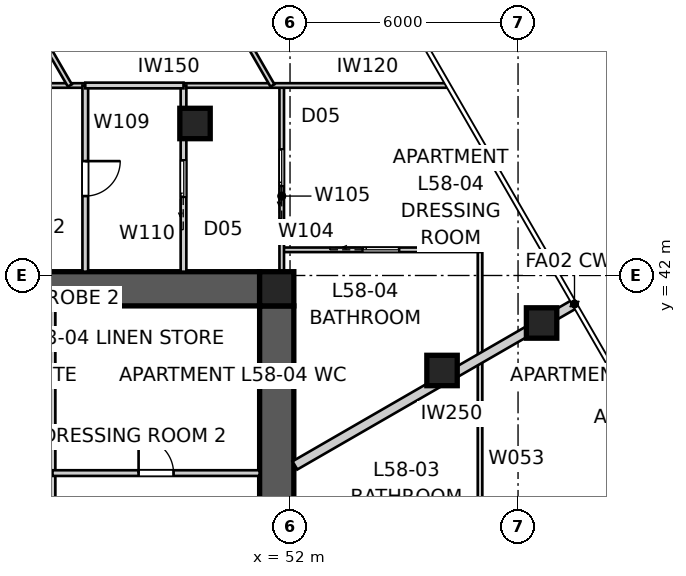
"""IFC4 building model, lengths in metres.
Left out: names, types, materials, properties, quantities, classifications, styles, units other than length and angle.
Written with IfcOpenShell. Run it as: python <this file> out.ifc"""

import sys

from ifc_helpers import new_model, si_unit, direction, frame, frame_2d, origin, origin_2d, place, context, subcontext, project, spatial, polyline, rectangle, outline, extrude, element, fill, save


model = new_model("IFC4")
c1 = context("Model", 3, precision=1e-05, world=origin(), true_north=direction((0.0, 1.0)))
c2 = subcontext(c1, "Body", "Model", "MODEL_VIEW")
j1 = project(units=[si_unit("LENGTHUNIT", "METRE"), si_unit("PLANEANGLEUNIT", "RADIAN")], contexts=[c1])
p1 = place(None, origin())
s1 = spatial("IfcSite", under=j1, at=p1, CompositionType="ELEMENT")
p2 = place(p1, origin())
s2 = spatial("IfcBuilding", under=s1, at=p2, CompositionType="ELEMENT")
p3 = place(p2, frame((0.0, 0.0, 211.6)))
s3 = spatial("IfcBuildingStorey", under=s2, at=p3, CompositionType="ELEMENT", Elevation=211.6)
p4 = place(p3, frame((28.8, 41.65, 0.0), z_axis=(0.0, 0.0, 1.0), x_axis=(1.0, 0.0, 0.0)))
e1 = element("IfcWall", 1, at=p4, inside=s3, PredefinedType="SHEAR", context=c2, shape_type="SweptSolid", body=[
    extrude(outline(polyline([(0.0, -0.45), (22.4, -0.45), (22.4, -0.025), (22.85, -0.025), (22.85, 0.025), (22.4, 0.025), (22.4, 0.45), (0.0, 0.45), (0.0, 0.025), (-0.45, 0.025), (-0.45, -0.025), (0.0, -0.025), (0.0, -0.45)])), origin(), (0.0, 0.0, 1.0), 3.4),
])
p5 = place(p3, frame((51.65, 18.8, 0.0), z_axis=(0.0, 0.0, 1.0), x_axis=(0.0, 1.0, 0.0)))
e2 = element("IfcWall", 2, at=p5, inside=s3, PredefinedType="SHEAR", context=c2, shape_type="SweptSolid", body=[
    extrude(outline(polyline([(0.0, -0.45), (22.4, -0.45), (22.4, -0.025), (22.85, -0.025), (22.85, 0.025), (22.4, 0.025), (22.4, 0.45), (0.0, 0.45), (0.0, 0.025), (-0.45, 0.025), (-0.45, -0.025), (0.0, -0.025), (0.0, -0.45)])), origin(), (0.0, 0.0, 1.0), 3.4),
])
p6 = place(p5, frame((11.14, 0.0, 0.0)))
e3 = element("IfcOpeningElement", 3, at=p6, cuts=e2, PredefinedType="OPENING", context=c2, shape_type="SweptSolid", body=[
    extrude(rectangle(XDim=1.02, YDim=2.4, at=frame_2d((0.51, 1.2))), frame((0.0, 0.46, 0.0), z_axis=(0.0, -1.0, 0.0), x_axis=(1.0, 0.0, 0.0)), (0.0, 0.0, 1.0), 0.92),
])
p7 = place(p3, frame((51.65, 41.65, 0.0), z_axis=(0.0, 0.0, 1.0), x_axis=(1.0, 0.0, 0.0)))
e4 = element("IfcColumn", 4, at=p7, inside=s3, PredefinedType="COLUMN", context=c2, shape_type="SweptSolid", body=[
    extrude(rectangle(XDim=0.9, YDim=0.9, at=origin_2d()), origin(), (0.0, 0.0, 1.0), 3.4),
])
for number, where, z_axis, x_axis in (
    (5, (58.62, 40.75, 0.0), (0.0, 0.0, 1.0), (1.0, 0.0, 0.0)),
    (6, (56.0, 39.5, 0.0), (0.0, 0.0, 1.0), (1.0, 0.0, 0.0)),
    (7, (49.5, 46.0, 0.0), (0.0, 0.0, 1.0), (1.0, 0.0, 0.0)),
):
    element("IfcColumn", number, at=place(p3, frame(where, z_axis=z_axis, x_axis=x_axis)), inside=s3, PredefinedType="COLUMN", context=c2, shape_type="SweptSolid", body=[
        extrude(rectangle(XDim=0.8, YDim=0.8, at=origin_2d()), origin(), (0.0, 0.0, 1.0), 3.4),
    ])
p8 = place(p3, frame((59.486, 41.25, 0.0), z_axis=(0.0, 0.0, 1.0), x_axis=(-0.866020489494, -0.500008511703, 0.0)))
e8 = element("IfcWall", 8, at=p8, inside=s3, PredefinedType="PARTITIONING", context=c2, shape_type="SweptSolid", body=[
    extrude(rectangle(XDim=8.496, YDim=0.25, at=frame_2d((4.248, 0.0))), origin(), (0.0, 0.0, 1.0), 3.25),
])
p9 = place(p3, frame((45.75, 41.2, 0.0), z_axis=(0.0, 0.0, 1.0), x_axis=(0.0, -1.0, 0.0)))
e9 = element("IfcWall", 9, at=p9, inside=s3, PredefinedType="SOLIDWALL", context=c2, shape_type="SweptSolid", body=[
    extrude(rectangle(XDim=5.9, YDim=0.15, at=frame_2d((2.95, 0.0))), origin(), (0.0, 0.0, 1.0), 3.25),
])
p10 = place(p3, frame((45.75, 36.8, 0.0), z_axis=(0.0, 0.0, 1.0), x_axis=(1.0, 0.0, 0.0)))
e10 = element("IfcWall", 10, at=p10, inside=s3, PredefinedType="SOLIDWALL", context=c2, shape_type="SweptSolid", body=[
    extrude(rectangle(XDim=5.45, YDim=0.15, at=frame_2d((2.725, 0.0))), origin(), (0.0, 0.0, 1.0), 3.25),
])
p11 = place(p10, frame((2.265, 0.0, 0.0)))
e11 = element("IfcOpeningElement", 11, at=p11, cuts=e10, PredefinedType="OPENING", context=c2, shape_type="SweptSolid", body=[
    extrude(rectangle(XDim=0.92, YDim=2.1, at=frame_2d((0.46, 1.05))), frame((0.0, 0.085, 0.0), z_axis=(0.0, -1.0, 0.0), x_axis=(1.0, 0.0, 0.0)), (0.0, 0.0, 1.0), 0.17),
])
p12 = place(p3, frame((57.0, 42.676, 0.0), z_axis=(0.0, 0.0, 1.0), x_axis=(0.0, -1.0, 0.0)))
e12 = element("IfcWall", 12, at=p12, inside=s3, PredefinedType="PARTITIONING", context=c2, shape_type="SweptSolid", body=[
    extrude(rectangle(XDim=23.19, YDim=0.12, at=frame_2d((11.595, 0.0))), origin(), (0.0, 0.0, 1.0), 2.55),
])
p13 = place(p12, frame((11.03, 0.0, 0.0)))
e13 = element("IfcOpeningElement", 13, at=p13, cuts=e12, PredefinedType="OPENING", context=c2, shape_type="SweptSolid", body=[
    extrude(rectangle(XDim=0.92, YDim=2.34, at=frame_2d((0.46, 1.17))), frame((0.0, 0.07, 0.0), z_axis=(0.0, -1.0, 0.0), x_axis=(1.0, 0.0, 0.0)), (0.0, 0.0, 1.0), 0.14),
])
p14 = place(p12, frame((15.181, 0.0, 0.0)))
e14 = element("IfcOpeningElement", 14, at=p14, cuts=e12, PredefinedType="OPENING", context=c2, shape_type="SweptSolid", body=[
    extrude(rectangle(XDim=0.92, YDim=2.34, at=frame_2d((0.46, 1.17))), frame((0.0, 0.07, 0.0), z_axis=(0.0, -1.0, 0.0), x_axis=(1.0, 0.0, 0.0)), (0.0, 0.0, 1.0), 0.14),
])
p15 = place(p3, frame((57.225, 34.085, 0.0), z_axis=(0.0, 0.0, 1.0), x_axis=(0.866019274569, 0.500010615962, 0.0)))
e15 = element("IfcWall", 15, at=p15, inside=s3, PredefinedType="PARTITIONING", context=c2, shape_type="SweptSolid", body=[
    extrude(rectangle(XDim=5.5, YDim=0.12, at=frame_2d((2.75, 0.0))), origin(), (0.0, 0.0, 1.0), 3.25),
])
p16 = place(p15, frame((2.31, 0.0, 0.0)))
e16 = element("IfcOpeningElement", 16, at=p16, cuts=e15, PredefinedType="OPENING", context=c2, shape_type="SweptSolid", body=[
    extrude(rectangle(XDim=0.92, YDim=2.34, at=frame_2d((0.46, 1.17))), frame((0.0, 0.07, 0.0), z_axis=(0.0, -1.0, 0.0), x_axis=(1.0, 0.0, 0.0)), (0.0, 0.0, 1.0), 0.14),
])
p17 = place(p3, frame((24.525, 47.0, 0.0), z_axis=(0.0, 0.0, 1.0), x_axis=(1.0, 0.0, 0.0)))
e17 = element("IfcWall", 17, at=p17, inside=s3, PredefinedType="PARTITIONING", context=c2, shape_type="SweptSolid", body=[
    extrude(rectangle(XDim=22.087, YDim=0.12, at=frame_2d((11.044, 0.0))), origin(), (0.0, 0.0, 1.0), 2.55),
])
p18 = place(p17, frame((1.928, 0.0, 0.0)))
e18 = element("IfcOpeningElement", 18, at=p18, cuts=e17, PredefinedType="OPENING", context=c2, shape_type="SweptSolid", body=[
    extrude(rectangle(XDim=0.92, YDim=2.34, at=frame_2d((0.46, 1.17))), frame((0.0, 0.07, 0.0), z_axis=(0.0, -1.0, 0.0), x_axis=(1.0, 0.0, 0.0)), (0.0, 0.0, 1.0), 0.14),
])
p19 = place(p17, frame((17.73, 0.0, 0.0)))
e19 = element("IfcOpeningElement", 19, at=p19, cuts=e17, PredefinedType="OPENING", context=c2, shape_type="SweptSolid", body=[
    extrude(rectangle(XDim=0.96, YDim=2.1, at=frame_2d((0.48, 1.05))), frame((0.0, 0.07, 0.0), z_axis=(0.0, -1.0, 0.0), x_axis=(1.0, 0.0, 0.0)), (0.0, 0.0, 1.0), 0.14),
])
p20 = place(p3, frame((51.782, 42.676, 0.0), z_axis=(0.0, 0.0, 1.0), x_axis=(1.0, 0.0, 0.0)))
e20 = element("IfcWall", 20, at=p20, inside=s3, PredefinedType="PARTITIONING", context=c2, shape_type="SweptSolid", body=[
    extrude(rectangle(XDim=5.218, YDim=0.12, at=frame_2d((2.609, 0.0))), origin(), (0.0, 0.0, 1.0), 3.25),
])
p21 = place(p20, frame((2.129, 0.0, 0.0)))
e21 = element("IfcOpeningElement", 21, at=p21, cuts=e20, PredefinedType="OPENING", context=c2, shape_type="SweptSolid", body=[
    extrude(rectangle(XDim=0.96, YDim=2.1, at=frame_2d((0.48, 1.05))), frame((0.0, 0.07, 0.0), z_axis=(0.0, -1.0, 0.0), x_axis=(1.0, 0.0, 0.0)), (0.0, 0.0, 1.0), 0.14),
])
p22 = place(p3, frame((51.782, 41.18, 0.0), z_axis=(0.0, 0.0, 1.0), x_axis=(0.0, 1.0, 0.0)))
e22 = element("IfcWall", 22, at=p22, inside=s3, PredefinedType="PARTITIONING", context=c2, shape_type="SweptSolid", body=[
    extrude(rectangle(XDim=5.82, YDim=0.12, at=frame_2d((2.91, 0.0))), origin(), (0.0, 0.0, 1.0), 3.25),
])
p23 = place(p22, frame((3.178, 0.0, 0.0)))
e23 = element("IfcOpeningElement", 23, at=p23, cuts=e22, PredefinedType="OPENING", context=c2, shape_type="SweptSolid", body=[
    extrude(rectangle(XDim=0.96, YDim=2.1, at=frame_2d((0.48, 1.05))), frame((0.0, 0.07, 0.0), z_axis=(0.0, -1.0, 0.0), x_axis=(1.0, 0.0, 0.0)), (0.0, 0.0, 1.0), 0.14),
])
p24 = place(p3, frame((49.197, 47.0, 0.0), z_axis=(0.0, 0.0, 1.0), x_axis=(1.0, 0.0, 0.0)))
e24 = element("IfcWall", 24, at=p24, inside=s3, PredefinedType="PARTITIONING", context=c2, shape_type="SweptSolid", body=[
    extrude(rectangle(XDim=6.923, YDim=0.12, at=frame_2d((3.461, 0.0))), origin(), (0.0, 0.0, 1.0), 3.25),
])
p25 = place(p3, frame((46.612, 47.0, 0.0), z_axis=(0.0, 0.0, 1.0), x_axis=(0.0, -1.0, 0.0)))
e25 = element("IfcWall", 25, at=p25, inside=s3, PredefinedType="SOLIDWALL", context=c2, shape_type="SweptSolid", body=[
    extrude(rectangle(XDim=4.9, YDim=0.15, at=frame_2d((2.45, 0.0))), origin(), (0.0, 0.0, 1.0), 3.25),
])
p26 = place(p25, frame((1.99, 0.0, 0.0)))
e26 = element("IfcOpeningElement", 26, at=p26, cuts=e25, PredefinedType="OPENING", context=c2, shape_type="SweptSolid", body=[
    extrude(rectangle(XDim=0.92, YDim=2.34, at=frame_2d((0.46, 1.17))), frame((0.0, 0.085, 0.0), z_axis=(0.0, -1.0, 0.0), x_axis=(1.0, 0.0, 0.0)), (0.0, 0.0, 1.0), 0.17),
])
p27 = place(p3, frame((49.197, 42.1, 0.0), z_axis=(0.0, 0.0, 1.0), x_axis=(0.0, 1.0, 0.0)))
e27 = element("IfcWall", 27, at=p27, inside=s3, PredefinedType="SOLIDWALL", context=c2, shape_type="SweptSolid", body=[
    extrude(rectangle(XDim=4.9, YDim=0.15, at=frame_2d((2.45, 0.0))), origin(), (0.0, 0.0, 1.0), 3.25),
])
p28 = place(p27, frame((1.97, 0.0, 0.0)))
e28 = element("IfcOpeningElement", 28, at=p28, cuts=e27, PredefinedType="OPENING", context=c2, shape_type="SweptSolid", body=[
    extrude(rectangle(XDim=0.96, YDim=2.1, at=frame_2d((0.48, 1.05))), frame((0.0, 0.085, 0.0), z_axis=(0.0, -1.0, 0.0), x_axis=(1.0, 0.0, 0.0)), (0.0, 0.0, 1.0), 0.17),
])
p29 = place(p3, frame((46.612, 47.0, 0.0), z_axis=(0.0, 0.0, 1.0), x_axis=(1.0, 0.0, 0.0)))
e29 = element("IfcWall", 29, at=p29, inside=s3, PredefinedType="SOLIDWALL", context=c2, shape_type="SweptSolid", body=[
    extrude(rectangle(XDim=2.585, YDim=0.15, at=frame_2d((1.292, 0.0))), origin(), (0.0, 0.0, 1.0), 3.25),
])
p30 = place(p3, frame((46.792, 55.237, 0.0), z_axis=(0.0, 0.0, 1.0), x_axis=(0.49923620881, -0.866465929978, 0.0)))
e30 = element("IfcWall", 30, at=p30, inside=s3, PredefinedType="PARTITIONING", context=c2, shape_type="SweptSolid", body=[
    extrude(rectangle(XDim=9.506, YDim=0.12, at=frame_2d((4.753, 0.0))), origin(), (0.0, 0.0, 1.0), 3.25),
])
p31 = place(p30, frame((6.586, 0.0, 0.0)))
e31 = element("IfcOpeningElement", 31, at=p31, cuts=e30, PredefinedType="OPENING", context=c2, shape_type="SweptSolid", body=[
    extrude(rectangle(XDim=0.92, YDim=2.34, at=frame_2d((0.46, 1.17))), frame((0.0, 0.07, 0.0), z_axis=(0.0, -1.0, 0.0), x_axis=(1.0, 0.0, 0.0)), (0.0, 0.0, 1.0), 0.14),
])
p32 = place(p30, frame((1.969, 0.0, 0.0)))
e32 = element("IfcOpeningElement", 32, at=p32, cuts=e30, PredefinedType="OPENING", context=c2, shape_type="SweptSolid", body=[
    extrude(rectangle(XDim=0.92, YDim=2.34, at=frame_2d((0.46, 1.17))), frame((0.0, 0.07, 0.0), z_axis=(0.0, -1.0, 0.0), x_axis=(1.0, 0.0, 0.0)), (0.0, 0.0, 1.0), 0.14),
])
p33 = place(p3, frame((46.207, 47.0, 0.0), z_axis=(0.0, 0.0, 1.0), x_axis=(-0.499986975689, 0.866032923243, 0.0)))
e33 = element("IfcWall", 33, at=p33, inside=s3, PredefinedType="PARTITIONING", context=c2, shape_type="SweptSolid", body=[
    extrude(rectangle(XDim=4.101, YDim=0.12, at=frame_2d((2.051, 0.0))), origin(), (0.0, 0.0, 1.0), 3.25),
])
p34 = place(p33, frame((1.891, 0.0, 0.0)))
e34 = element("IfcOpeningElement", 34, at=p34, cuts=e33, PredefinedType="OPENING", context=c2, shape_type="SweptSolid", body=[
    extrude(rectangle(XDim=0.92, YDim=2.34, at=frame_2d((0.46, 1.17))), frame((0.0, 0.07, 0.0), z_axis=(0.0, -1.0, 0.0), x_axis=(1.0, 0.0, 0.0)), (0.0, 0.0, 1.0), 0.14),
])
p35 = place(p11, origin())
e35 = element("IfcDoor", 35, at=p35, inside=s3, OperationType="SINGLE_SWING_LEFT", PredefinedType="DOOR", context=c2, shape_type="SweptSolid", body=[
    extrude(rectangle(XDim=0.92, YDim=2.1, at=frame_2d((0.46, 1.05))), frame((0.0, 0.025, 0.0), z_axis=(0.0, -1.0, 0.0), x_axis=(1.0, 0.0, 0.0)), (0.0, 0.0, 1.0), 0.05),
])
fill(e11, e35)
p36 = place(p26, origin())
e36 = element("IfcDoor", 36, at=p36, inside=s3, OperationType="SINGLE_SWING_LEFT", PredefinedType="DOOR", context=c2, shape_type="SweptSolid", body=[
    extrude(rectangle(XDim=0.92, YDim=2.34, at=frame_2d((0.46, 1.17))), frame((0.0, 0.025, 0.0), z_axis=(0.0, -1.0, 0.0), x_axis=(1.0, 0.0, 0.0)), (0.0, 0.0, 1.0), 0.05),
])
fill(e26, e36)
p37 = place(p28, origin())
e37 = element("IfcDoor", 37, at=p37, inside=s3, OperationType="SLIDING_TO_LEFT", PredefinedType="DOOR", context=c2, shape_type="SweptSolid", body=[
    extrude(rectangle(XDim=0.96, YDim=2.1, at=frame_2d((0.48, 1.05))), frame((0.0, 0.025, 0.0), z_axis=(0.0, -1.0, 0.0), x_axis=(1.0, 0.0, 0.0)), (0.0, 0.0, 1.0), 0.05),
])
fill(e28, e37)
p38 = place(p23, origin())
e38 = element("IfcDoor", 38, at=p38, inside=s3, OperationType="SLIDING_TO_LEFT", PredefinedType="DOOR", context=c2, shape_type="SweptSolid", body=[
    extrude(rectangle(XDim=0.96, YDim=2.1, at=frame_2d((0.48, 1.05))), frame((0.0, 0.025, 0.0), z_axis=(0.0, -1.0, 0.0), x_axis=(1.0, 0.0, 0.0)), (0.0, 0.0, 1.0), 0.05),
])
fill(e23, e38)
p39 = place(p21, origin())
e39 = element("IfcDoor", 39, at=p39, inside=s3, OperationType="SLIDING_TO_LEFT", PredefinedType="DOOR", context=c2, shape_type="SweptSolid", body=[
    extrude(rectangle(XDim=0.96, YDim=2.1, at=frame_2d((0.48, 1.05))), frame((0.0, 0.025, 0.0), z_axis=(0.0, -1.0, 0.0), x_axis=(1.0, 0.0, 0.0)), (0.0, 0.0, 1.0), 0.05),
])
fill(e21, e39)
save(model, sys.argv[1])
